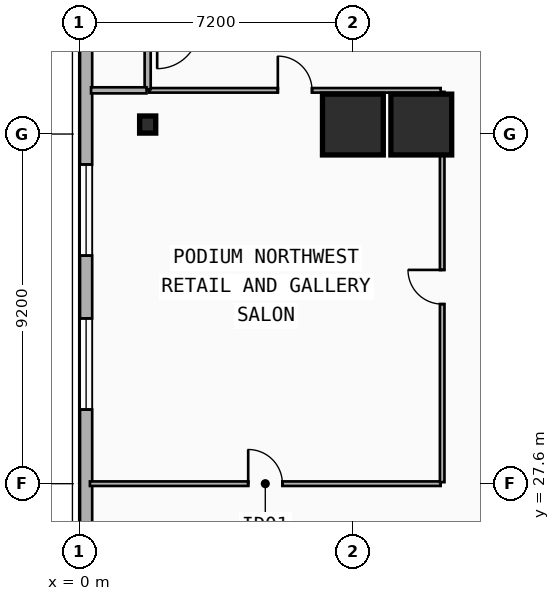
"""IFC4 building model, lengths in metres.
Left out: names, types, materials, properties, quantities, classifications, styles, units other than length and angle.
Written with IfcOpenShell. Run it as: python <this file> out.ifc"""

import sys

from ifc_helpers import new_model, si_unit, direction, frame, frame_2d, origin, origin_2d, place, context, subcontext, project, spatial, rectangle, i_section, extrude, element, fill, save


model = new_model("IFC4")
c1 = context("Model", 3, precision=1e-05, world=origin(), true_north=direction((0.0, 1.0)))
c2 = subcontext(c1, "Body", "Model", "MODEL_VIEW")
j1 = project(units=[si_unit("LENGTHUNIT", "METRE"), si_unit("PLANEANGLEUNIT", "RADIAN")], contexts=[c1])
p1 = place(None, origin())
s1 = spatial("IfcSite", under=j1, at=p1, CompositionType="ELEMENT")
p2 = place(p1, origin())
s2 = spatial("IfcBuilding", under=s1, at=p2, CompositionType="ELEMENT")
p3 = place(p2, frame((0.0, 0.0, 5.4)))
s3 = spatial("IfcBuildingStorey", under=s2, at=p3, CompositionType="ELEMENT", Elevation=5.4)
p4 = place(p3, frame((1.8, 37.05, 0.0), z_axis=(0.0, 0.0, 1.0), x_axis=(1.0, 0.0, 0.0)))
e1 = element("IfcColumn", 1, at=p4, inside=s3, PredefinedType="COLUMN", context=c2, shape_type="SweptSolid", body=[
    extrude(i_section(OverallWidth=0.424, OverallDepth=0.45, WebThickness=0.041, FlangeThickness=0.065, FilletRadius=0.015, at=origin_2d()), origin(), (0.0, 0.0, 1.0), 5.0),
])
for number, where, z_axis, x_axis in (
    (2, (7.2, 37.05, 0.0), (0.0, 0.0, 1.0), (1.0, 0.0, 0.0)),
    (3, (9.0, 37.05, 0.0), (0.0, 0.0, 1.0), (1.0, 0.0, 0.0)),
):
    element("IfcColumn", number, at=place(p3, frame(where, z_axis=z_axis, x_axis=x_axis)), inside=s3, PredefinedType="COLUMN", context=c2, shape_type="SweptSolid", body=[
        extrude(rectangle(XDim=1.6, YDim=1.6, at=origin_2d()), origin(), (0.0, 0.0, 1.0), 5.0),
    ])
p5 = place(p3, frame((0.18, 7.2, 0.0), z_axis=(0.0, 0.0, 1.0), x_axis=(0.0, 1.0, 0.0)))
e4 = element("IfcWall", 4, at=p5, inside=s3, PredefinedType="SOLIDWALL", context=c2, shape_type="SweptSolid", body=[
    extrude(rectangle(XDim=34.4, YDim=0.32, at=frame_2d((17.2, 0.0))), origin(), (0.0, 0.0, 1.0), 4.7),
])
p6 = place(p5, frame((22.35, 0.0, 0.9)))
e5 = element("IfcOpeningElement", 5, at=p6, cuts=e4, PredefinedType="OPENING", context=c2, shape_type="SweptSolid", body=[
    extrude(rectangle(XDim=2.4, YDim=1.8, at=frame_2d((1.2, 0.9))), frame((0.0, 0.17, 0.0), z_axis=(0.0, -1.0, 0.0), x_axis=(1.0, 0.0, 0.0)), (0.0, 0.0, 1.0), 0.34),
])
p7 = place(p5, frame((26.4, 0.0, 0.9)))
e6 = element("IfcOpeningElement", 6, at=p7, cuts=e4, PredefinedType="OPENING", context=c2, shape_type="SweptSolid", body=[
    extrude(rectangle(XDim=2.4, YDim=1.8, at=frame_2d((1.2, 0.9))), frame((0.0, 0.17, 0.0), z_axis=(0.0, -1.0, 0.0), x_axis=(1.0, 0.0, 0.0)), (0.0, 0.0, 1.0), 0.34),
])
p8 = place(p3, frame((0.28, 27.6, 0.0), z_axis=(0.0, 0.0, 1.0), x_axis=(1.0, 0.0, 0.0)))
e7 = element("IfcWall", 7, at=p8, inside=s3, PredefinedType="PARTITIONING", context=c2, shape_type="SweptSolid", body=[
    extrude(rectangle(XDim=9.23, YDim=0.12, at=frame_2d((4.615, 0.0))), origin(), (0.0, 0.0, 1.0), 4.7),
])
p9 = place(p8, frame((4.165, 0.0, 0.0)))
e8 = element("IfcOpeningElement", 8, at=p9, cuts=e7, PredefinedType="OPENING", context=c2, shape_type="SweptSolid", body=[
    extrude(rectangle(XDim=0.9, YDim=2.1, at=frame_2d((0.45, 1.05))), frame((0.0, 0.07, 0.0), z_axis=(0.0, -1.0, 0.0), x_axis=(1.0, 0.0, 0.0)), (0.0, 0.0, 1.0), 0.14),
])
p10 = place(p3, frame((9.55, 27.64, 0.0), z_axis=(0.0, 0.0, 1.0), x_axis=(0.0, 1.0, 0.0)))
e9 = element("IfcWall", 9, at=p10, inside=s3, PredefinedType="PARTITIONING", context=c2, shape_type="SweptSolid", body=[
    extrude(rectangle(XDim=10.27, YDim=0.12, at=frame_2d((5.135, 0.0))), origin(), (0.0, 0.0, 1.0), 4.7),
])
p11 = place(p10, frame((4.685, 0.0, 0.0)))
e10 = element("IfcOpeningElement", 10, at=p11, cuts=e9, PredefinedType="OPENING", context=c2, shape_type="SweptSolid", body=[
    extrude(rectangle(XDim=0.9, YDim=2.1, at=frame_2d((0.45, 1.05))), frame((0.0, 0.07, 0.0), z_axis=(0.0, -1.0, 0.0), x_axis=(1.0, 0.0, 0.0)), (0.0, 0.0, 1.0), 0.14),
])
p12 = place(p3, frame((1.84, 37.95, 0.0), z_axis=(0.0, 0.0, 1.0), x_axis=(1.0, 0.0, 0.0)))
e11 = element("IfcWall", 11, at=p12, inside=s3, PredefinedType="PARTITIONING", context=c2, shape_type="SweptSolid", body=[
    extrude(rectangle(XDim=7.67, YDim=0.12, at=frame_2d((3.835, 0.0))), origin(), (0.0, 0.0, 1.0), 4.7),
])
p13 = place(p12, frame((3.385, 0.0, 0.0)))
e12 = element("IfcOpeningElement", 12, at=p13, cuts=e11, PredefinedType="OPENING", context=c2, shape_type="SweptSolid", body=[
    extrude(rectangle(XDim=0.9, YDim=2.1, at=frame_2d((0.45, 1.05))), frame((0.0, 0.07, 0.0), z_axis=(0.0, -1.0, 0.0), x_axis=(1.0, 0.0, 0.0)), (0.0, 0.0, 1.0), 0.14),
])
p14 = place(p3, frame((1.8, 37.98, 0.0), z_axis=(0.0, 0.0, 1.0), x_axis=(0.0, 1.0, 0.0)))
e13 = element("IfcWall", 13, at=p14, inside=s3, PredefinedType="PARTITIONING", context=c2, shape_type="SweptSolid", body=[
    extrude(rectangle(XDim=1.785, YDim=0.16, at=frame_2d((0.893, 0.0))), origin(), (0.0, 0.0, 1.0), 4.7),
])
p15 = place(p3, frame((0.31, 37.95, 0.0), z_axis=(0.0, 0.0, 1.0), x_axis=(1.0, 0.0, 0.0)))
e14 = element("IfcWall", 14, at=p15, inside=s3, PredefinedType="PARTITIONING", context=c2, shape_type="SweptSolid", body=[
    extrude(rectangle(XDim=1.46, YDim=0.16, at=frame_2d((0.73, 0.0))), origin(), (0.0, 0.0, 1.0), 4.7),
])
p16 = place(p6, origin())
e15 = element("IfcWindow", 15, at=p16, inside=s3, PartitioningType="SINGLE_PANEL", PredefinedType="WINDOW", context=c2, shape_type="SweptSolid", body=[
    extrude(rectangle(XDim=2.4, YDim=1.8, at=frame_2d((1.2, 0.9))), frame((0.0, 0.03, 0.0), z_axis=(0.0, -1.0, 0.0), x_axis=(1.0, 0.0, 0.0)), (0.0, 0.0, 1.0), 0.06),
])
fill(e5, e15)
p17 = place(p7, origin())
e16 = element("IfcWindow", 16, at=p17, inside=s3, PartitioningType="SINGLE_PANEL", PredefinedType="WINDOW", context=c2, shape_type="SweptSolid", body=[
    extrude(rectangle(XDim=2.4, YDim=1.8, at=frame_2d((1.2, 0.9))), frame((0.0, 0.03, 0.0), z_axis=(0.0, -1.0, 0.0), x_axis=(1.0, 0.0, 0.0)), (0.0, 0.0, 1.0), 0.06),
])
fill(e6, e16)
p18 = place(p9, origin())
e17 = element("IfcDoor", 17, at=p18, inside=s3, OperationType="SINGLE_SWING_LEFT", PredefinedType="DOOR", context=c2, shape_type="SweptSolid", body=[
    extrude(rectangle(XDim=0.9, YDim=2.1, at=frame_2d((0.45, 1.05))), frame((0.0, 0.025, 0.0), z_axis=(0.0, -1.0, 0.0), x_axis=(1.0, 0.0, 0.0)), (0.0, 0.0, 1.0), 0.05),
])
fill(e8, e17)
p19 = place(p11, origin())
e18 = element("IfcDoor", 18, at=p19, inside=s3, OperationType="SINGLE_SWING_RIGHT", PredefinedType="DOOR", context=c2, shape_type="SweptSolid", body=[
    extrude(rectangle(XDim=0.9, YDim=2.1, at=frame_2d((0.45, 1.05))), frame((0.0, 0.025, 0.0), z_axis=(0.0, -1.0, 0.0), x_axis=(1.0, 0.0, 0.0)), (0.0, 0.0, 1.0), 0.05),
])
fill(e10, e18)
p20 = place(p13, origin())
e19 = element("IfcDoor", 19, at=p20, inside=s3, OperationType="SINGLE_SWING_LEFT", PredefinedType="DOOR", context=c2, shape_type="SweptSolid", body=[
    extrude(rectangle(XDim=0.9, YDim=2.1, at=frame_2d((0.45, 1.05))), frame((0.0, 0.025, 0.0), z_axis=(0.0, -1.0, 0.0), x_axis=(1.0, 0.0, 0.0)), (0.0, 0.0, 1.0), 0.05),
])
fill(e12, e19)
save(model, sys.argv[1])
